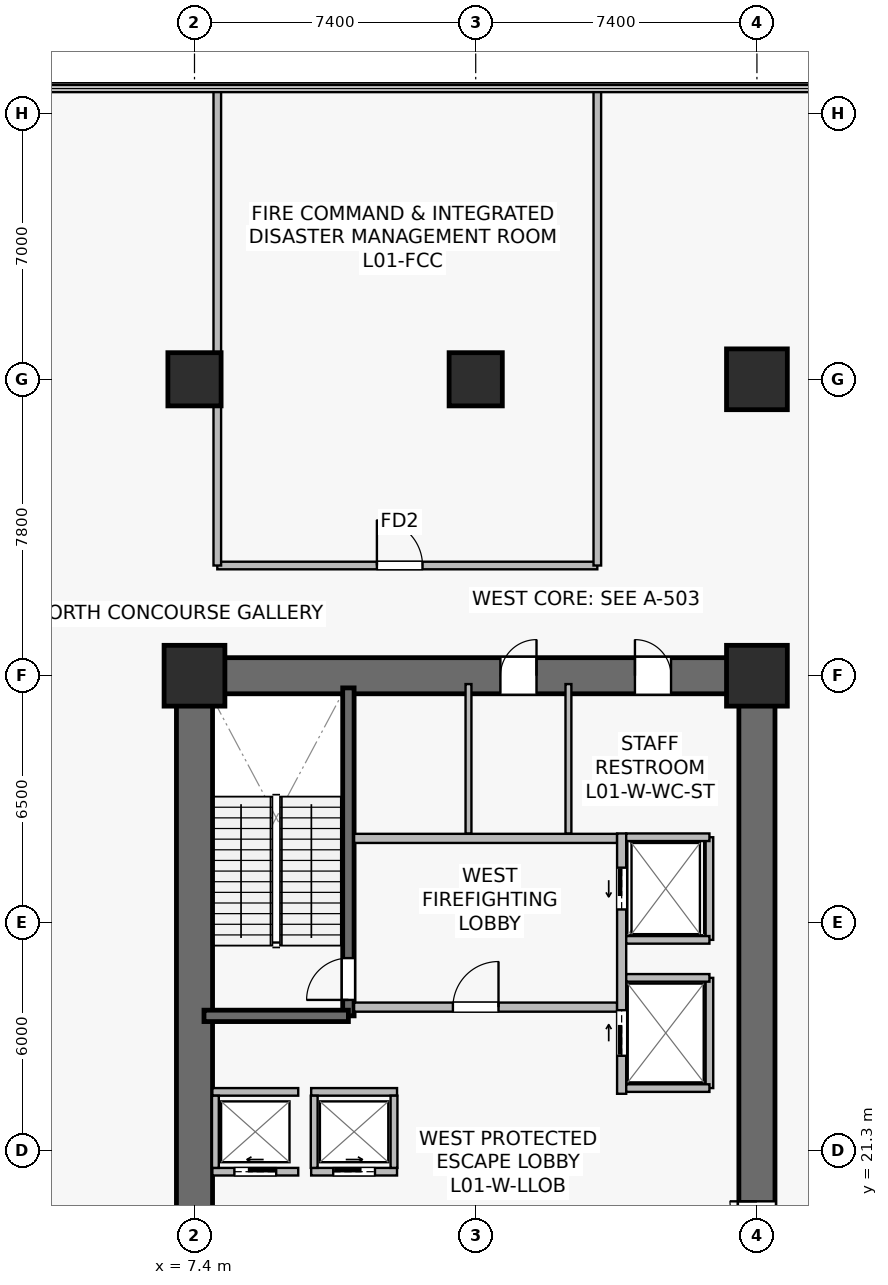
"""IFC4 building model, lengths in metres.
Left out: names, types, materials, properties, quantities, classifications, styles, units other than length and angle.
Written with IfcOpenShell. Run it as: python <this file> out.ifc"""

import sys

from ifc_helpers import new_model, si_unit, direction, frame, frame_2d, origin, origin_2d, place, context, subcontext, project, spatial, rectangle, extrude, source, transform, mapped, element, fill, save


model = new_model("IFC4")
c1 = context("Model", 3, precision=1e-05, world=origin(), true_north=direction((0.0, 1.0)))
c2 = subcontext(c1, "Body", "Model", "MODEL_VIEW")
j1 = project(units=[si_unit("LENGTHUNIT", "METRE"), si_unit("PLANEANGLEUNIT", "RADIAN")], contexts=[c1])
p1 = place(None, origin())
s1 = spatial("IfcSite", under=j1, at=p1, CompositionType="ELEMENT")
p2 = place(p1, origin())
s2 = spatial("IfcBuilding", under=s1, at=p2, CompositionType="ELEMENT")
p3 = place(p2, origin())
s3 = spatial("IfcBuildingStorey", under=s2, at=p3, CompositionType="ELEMENT", Elevation=0.0)
p4 = place(p3, frame((6.925, 33.8, 0.0), z_axis=(0.0, 0.0, 1.0), x_axis=(1.0, 0.0, 0.0)))
e1 = element("IfcWall", 1, at=p4, inside=s3, PredefinedType="SHEAR", context=c2, shape_type="SweptSolid", body=[
    extrude(rectangle(XDim=15.75, YDim=0.95, at=frame_2d((7.875, 0.0))), origin(), (0.0, 0.0, 1.0), 5.05),
])
p5 = place(p4, frame((8.525, 0.0, 0.0)))
e2 = element("IfcOpeningElement", 2, at=p5, cuts=e1, PredefinedType="OPENING", context=c2, shape_type="SweptSolid", body=[
    extrude(rectangle(XDim=0.95, YDim=2.15, at=frame_2d((0.475, 1.075))), frame((0.0, 0.485, 0.0), z_axis=(0.0, -1.0, 0.0), x_axis=(1.0, 0.0, 0.0)), (0.0, 0.0, 1.0), 0.97),
])
p6 = place(p4, frame((12.065, 0.0, 0.0)))
e3 = element("IfcOpeningElement", 3, at=p6, cuts=e1, PredefinedType="OPENING", context=c2, shape_type="SweptSolid", body=[
    extrude(rectangle(XDim=0.95, YDim=2.15, at=frame_2d((0.475, 1.075))), frame((0.0, 0.485, 0.0), z_axis=(0.0, -1.0, 0.0), x_axis=(1.0, 0.0, 0.0)), (0.0, 0.0, 1.0), 0.97),
])
p7 = place(p3, frame((7.4, 15.275, 0.0), z_axis=(0.0, 0.0, 1.0), x_axis=(0.0, 1.0, 0.0)))
e4 = element("IfcWall", 4, at=p7, inside=s3, PredefinedType="SHEAR", context=c2, shape_type="SweptSolid", body=[
    extrude(rectangle(XDim=18.05, YDim=0.95, at=frame_2d((9.025, 0.0))), origin(), (0.0, 0.0, 1.0), 5.05),
])
p8 = place(p3, frame((22.2, 15.275, 0.0), z_axis=(0.0, 0.0, 1.0), x_axis=(0.0, 1.0, 0.0)))
e5 = element("IfcWall", 5, at=p8, inside=s3, PredefinedType="SHEAR", context=c2, shape_type="SweptSolid", body=[
    extrude(rectangle(XDim=18.05, YDim=0.95, at=frame_2d((9.025, 0.0))), origin(), (0.0, 0.0, 1.0), 5.05),
])
p9 = place(p8, frame((3.275, 0.0, 0.0)))
e6 = element("IfcOpeningElement", 6, at=p9, cuts=e5, PredefinedType="OPENING", context=c2, shape_type="SweptSolid", body=[
    extrude(rectangle(XDim=1.42, YDim=2.2, at=frame_2d((0.71, 1.1))), frame((0.0, 0.485, 0.0), z_axis=(0.0, -1.0, 0.0), x_axis=(1.0, 0.0, 0.0)), (0.0, 0.0, 1.0), 0.97),
])
p10 = place(p3, frame((11.45, 24.85, 0.0), z_axis=(0.0, 0.0, 1.0), x_axis=(0.0, 1.0, 0.0)))
e7 = element("IfcWall", 7, at=p10, inside=s3, PredefinedType="SHEAR", context=c2, shape_type="SweptSolid", body=[
    extrude(rectangle(XDim=8.63, YDim=0.3, at=frame_2d((4.315, 0.0))), origin(), (0.0, 0.0, 1.0), 5.05),
])
p11 = place(p10, frame((0.42, 0.0, 0.0)))
e8 = element("IfcOpeningElement", 8, at=p11, cuts=e7, PredefinedType="OPENING", context=c2, shape_type="SweptSolid", body=[
    extrude(rectangle(XDim=1.1, YDim=2.15, at=frame_2d((0.55, 1.075))), frame((0.0, 0.16, 0.0), z_axis=(0.0, -1.0, 0.0), x_axis=(1.0, 0.0, 0.0)), (0.0, 0.0, 1.0), 0.32),
])
p12 = place(p3, frame((7.65, 24.85, 0.0), z_axis=(0.0, 0.0, 1.0), x_axis=(1.0, 0.0, 0.0)))
e9 = element("IfcWall", 9, at=p12, inside=s3, PredefinedType="SHEAR", context=c2, shape_type="SweptSolid", body=[
    extrude(rectangle(XDim=3.8, YDim=0.3, at=frame_2d((1.9, 0.0))), origin(), (0.0, 0.0, 1.0), 5.05),
])
m1 = source(origin(), c2, "Body", "SweptSolid", [
    extrude(rectangle(XDim=1.6, YDim=1.6, at=origin_2d()), origin(), (0.0, 0.0, 1.0), 5.4),
])
for number, where, z_axis, x_axis in (
    (10, (7.4, 33.8, 0.0), (0.0, 0.0, 1.0), (1.0, 0.0, 0.0)),
    (11, (22.2, 33.8, 0.0), (0.0, 0.0, 1.0), (1.0, 0.0, 0.0)),
):
    element("IfcColumn", number, at=place(p3, frame(where, z_axis=z_axis, x_axis=x_axis)), inside=s3, PredefinedType="COLUMN", context=c2, shape_type="MappedRepresentation", body=[
        mapped(m1, transform((0.0, 0.0, 0.0), scale=1.0)),
    ])
m2 = source(origin(), c2, "Body", "SweptSolid", [
    extrude(rectangle(XDim=1.4, YDim=1.4, at=origin_2d()), origin(), (0.0, 0.0, 1.0), 5.4),
])
p13 = place(p3, frame((14.8, 41.6, 0.0), z_axis=(0.0, 0.0, 1.0), x_axis=(1.0, 0.0, 0.0)))
e12 = element("IfcColumn", 12, at=p13, inside=s3, PredefinedType="COLUMN", context=c2, shape_type="MappedRepresentation", body=[
    mapped(m2, transform((0.0, 0.0, 0.0), scale=1.0)),
])
p14 = place(p3, frame((22.2, 41.6, 0.0), z_axis=(0.0, 0.0, 1.0), x_axis=(1.0, 0.0, 0.0)))
e13 = element("IfcColumn", 13, at=p14, inside=s3, PredefinedType="COLUMN", context=c2, shape_type="MappedRepresentation", body=[
    mapped(m1, transform((0.0, 0.0, 0.0), scale=1.0)),
])
p15 = place(p3, frame((7.4, 41.6, 0.0), z_axis=(0.0, 0.0, 1.0), x_axis=(1.0, 0.0, 0.0)))
e14 = element("IfcColumn", 14, at=p15, inside=s3, PredefinedType="COLUMN", context=c2, shape_type="MappedRepresentation", body=[
    mapped(m2, transform((0.0, 0.0, 0.0), scale=1.0)),
])
p16 = place(p3, frame((11.6, 25.08, 0.0), z_axis=(0.0, 0.0, 1.0), x_axis=(1.0, 0.0, 0.0)))
e15 = element("IfcWall", 15, at=p16, inside=s3, PredefinedType="SOLIDWALL", context=c2, shape_type="SweptSolid", body=[
    extrude(rectangle(XDim=6.92, YDim=0.24, at=frame_2d((3.46, 0.0))), origin(), (0.0, 0.0, 1.0), 4.335),
])
p17 = place(p16, frame((2.6, 0.0, 0.0)))
e16 = element("IfcOpeningElement", 16, at=p17, cuts=e15, PredefinedType="OPENING", context=c2, shape_type="SweptSolid", body=[
    extrude(rectangle(XDim=1.2, YDim=2.16, at=frame_2d((0.6, 1.08))), frame((0.0, 0.13, 0.0), z_axis=(0.0, -1.0, 0.0), x_axis=(1.0, 0.0, 0.0)), (0.0, 0.0, 1.0), 0.26),
])
p18 = place(p3, frame((11.6, 29.52, 0.0), z_axis=(0.0, 0.0, 1.0), x_axis=(1.0, 0.0, 0.0)))
e17 = element("IfcWall", 17, at=p18, inside=s3, PredefinedType="SOLIDWALL", context=c2, shape_type="SweptSolid", body=[
    extrude(rectangle(XDim=6.92, YDim=0.24, at=frame_2d((3.46, 0.0))), origin(), (0.0, 0.0, 1.0), 4.335),
])
p19 = place(p3, frame((18.64, 22.8, 0.0), z_axis=(0.0, 0.0, 1.0), x_axis=(0.0, 1.0, 0.0)))
e18 = element("IfcWall", 18, at=p19, inside=s3, PredefinedType="SOLIDWALL", context=c2, shape_type="SweptSolid", body=[
    extrude(rectangle(XDim=6.85, YDim=0.24, at=frame_2d((3.425, 0.0))), origin(), (0.0, 0.0, 1.0), 4.135),
])
p20 = place(p19, frame((4.85, 0.0, 0.0)))
e19 = element("IfcOpeningElement", 19, at=p20, cuts=e18, PredefinedType="OPENING", context=c2, shape_type="SweptSolid", body=[
    extrude(rectangle(XDim=1.1, YDim=2.22, at=frame_2d((0.55, 1.11))), frame((0.0, 0.13, 0.0), z_axis=(0.0, -1.0, 0.0), x_axis=(1.0, 0.0, 0.0)), (0.0, 0.0, 1.0), 0.26),
])
p21 = place(p19, frame((1.0, 0.0, 0.0)))
e20 = element("IfcOpeningElement", 20, at=p21, cuts=e18, PredefinedType="OPENING", context=c2, shape_type="SweptSolid", body=[
    extrude(rectangle(XDim=1.2, YDim=2.22, at=frame_2d((0.6, 1.11))), frame((0.0, 0.13, 0.0), z_axis=(0.0, -1.0, 0.0), x_axis=(1.0, 0.0, 0.0)), (0.0, 0.0, 1.0), 0.26),
])
p22 = place(p3, frame((7.87, 20.75, 0.0), z_axis=(0.0, 0.0, 1.0), x_axis=(1.0, 0.0, 0.0)))
e21 = element("IfcWall", 21, at=p22, inside=s3, PredefinedType="SOLIDWALL", context=c2, shape_type="SweptSolid", body=[
    extrude(rectangle(XDim=2.26, YDim=0.2, at=frame_2d((1.13, 0.0))), origin(), (0.0, 0.0, 1.0), 5.05),
])
p23 = place(p22, frame((0.58, 0.0, 0.0)))
e22 = element("IfcOpeningElement", 22, at=p23, cuts=e21, PredefinedType="OPENING", context=c2, shape_type="SweptSolid", body=[
    extrude(rectangle(XDim=1.1, YDim=2.22, at=frame_2d((0.55, 1.11))), frame((0.0, 0.11, 0.0), z_axis=(0.0, -1.0, 0.0), x_axis=(1.0, 0.0, 0.0)), (0.0, 0.0, 1.0), 0.22),
])
p24 = place(p3, frame((7.87, 22.85, 0.0), z_axis=(0.0, 0.0, 1.0), x_axis=(1.0, 0.0, 0.0)))
e23 = element("IfcWall", 23, at=p24, inside=s3, PredefinedType="SOLIDWALL", context=c2, shape_type="SweptSolid", body=[
    extrude(rectangle(XDim=2.26, YDim=0.2, at=frame_2d((1.13, 0.0))), origin(), (0.0, 0.0, 1.0), 5.05),
])
p25 = place(p3, frame((7.95, 20.85, 0.0), z_axis=(0.0, 0.0, 1.0), x_axis=(0.0, 1.0, 0.0)))
e24 = element("IfcWall", 24, at=p25, inside=s3, PredefinedType="SOLIDWALL", context=c2, shape_type="SweptSolid", body=[
    extrude(rectangle(XDim=1.9, YDim=0.18, at=frame_2d((0.95, 0.0))), origin(), (0.0, 0.0, 1.0), 5.05),
])
p26 = place(p3, frame((10.47, 20.75, 0.0), z_axis=(0.0, 0.0, 1.0), x_axis=(1.0, 0.0, 0.0)))
e25 = element("IfcWall", 25, at=p26, inside=s3, PredefinedType="SOLIDWALL", context=c2, shape_type="SweptSolid", body=[
    extrude(rectangle(XDim=2.26, YDim=0.2, at=frame_2d((1.13, 0.0))), origin(), (0.0, 0.0, 1.0), 5.05),
])
p27 = place(p26, frame((0.58, 0.0, 0.0)))
e26 = element("IfcOpeningElement", 26, at=p27, cuts=e25, PredefinedType="OPENING", context=c2, shape_type="SweptSolid", body=[
    extrude(rectangle(XDim=1.1, YDim=2.22, at=frame_2d((0.55, 1.11))), frame((0.0, 0.11, 0.0), z_axis=(0.0, -1.0, 0.0), x_axis=(1.0, 0.0, 0.0)), (0.0, 0.0, 1.0), 0.22),
])
p28 = place(p3, frame((10.47, 22.85, 0.0), z_axis=(0.0, 0.0, 1.0), x_axis=(1.0, 0.0, 0.0)))
e27 = element("IfcWall", 27, at=p28, inside=s3, PredefinedType="SOLIDWALL", context=c2, shape_type="SweptSolid", body=[
    extrude(rectangle(XDim=2.26, YDim=0.2, at=frame_2d((1.13, 0.0))), origin(), (0.0, 0.0, 1.0), 5.05),
])
for number, where, z_axis, x_axis in (
    (28, (10.55, 20.85, 0.0), (0.0, 0.0, 1.0), (0.0, 1.0, 0.0)),
    (29, (12.65, 20.85, 0.0), (0.0, 0.0, 1.0), (0.0, 1.0, 0.0)),
):
    element("IfcWall", number, at=place(p3, frame(where, z_axis=z_axis, x_axis=x_axis)), inside=s3, PredefinedType="SOLIDWALL", context=c2, shape_type="SweptSolid", body=[
        extrude(rectangle(XDim=1.9, YDim=0.18, at=frame_2d((0.95, 0.0))), origin(), (0.0, 0.0, 1.0), 5.05),
    ])
p29 = place(p3, frame((20.95, 26.85, 0.0), z_axis=(0.0, 0.0, 1.0), x_axis=(0.0, 1.0, 0.0)))
e30 = element("IfcWall", 30, at=p29, inside=s3, PredefinedType="SOLIDWALL", context=c2, shape_type="SweptSolid", body=[
    extrude(rectangle(XDim=2.7, YDim=0.2, at=frame_2d((1.35, 0.0))), origin(), (0.0, 0.0, 1.0), 5.05),
])
p30 = place(p3, frame((18.76, 29.55, 0.0), z_axis=(0.0, 0.0, 1.0), x_axis=(1.0, 0.0, 0.0)))
e31 = element("IfcWall", 31, at=p30, inside=s3, PredefinedType="SOLIDWALL", context=c2, shape_type="SweptSolid", body=[
    extrude(rectangle(XDim=2.19, YDim=0.2, at=frame_2d((1.095, 0.0))), origin(), (0.0, 0.0, 1.0), 5.05),
])
p31 = place(p3, frame((18.76, 26.85, 0.0), z_axis=(0.0, 0.0, 1.0), x_axis=(1.0, 0.0, 0.0)))
e32 = element("IfcWall", 32, at=p31, inside=s3, PredefinedType="SOLIDWALL", context=c2, shape_type="SweptSolid", body=[
    extrude(rectangle(XDim=2.19, YDim=0.2, at=frame_2d((1.095, 0.0))), origin(), (0.0, 0.0, 1.0), 4.447),
])
p32 = place(p3, frame((20.95, 22.95, 0.0), z_axis=(0.0, 0.0, 1.0), x_axis=(0.0, 1.0, 0.0)))
e33 = element("IfcWall", 33, at=p32, inside=s3, PredefinedType="SOLIDWALL", context=c2, shape_type="SweptSolid", body=[
    extrude(rectangle(XDim=2.9, YDim=0.2, at=frame_2d((1.45, 0.0))), origin(), (0.0, 0.0, 1.0), 4.135),
])
for number, where, z_axis, x_axis in (
    (34, (18.76, 25.85, 0.0), (0.0, 0.0, 1.0), (1.0, 0.0, 0.0)),
    (35, (18.76, 22.95, 0.0), (0.0, 0.0, 1.0), (1.0, 0.0, 0.0)),
):
    element("IfcWall", number, at=place(p3, frame(where, z_axis=z_axis, x_axis=x_axis)), inside=s3, PredefinedType="SOLIDWALL", context=c2, shape_type="SweptSolid", body=[
        extrude(rectangle(XDim=2.19, YDim=0.2, at=frame_2d((1.095, 0.0))), origin(), (0.0, 0.0, 1.0), 5.05),
    ])
p33 = place(p3, frame((14.61, 29.65, 0.0), z_axis=(0.0, 0.0, 1.0), x_axis=(0.0, 1.0, 0.0)))
e36 = element("IfcWall", 36, at=p33, inside=s3, PredefinedType="PLUMBINGWALL", context=c2, shape_type="SweptSolid", body=[
    extrude(rectangle(XDim=3.93, YDim=0.155, at=frame_2d((1.965, 0.0))), origin(), (0.0, 0.0, 1.0), 4.335),
])
p34 = place(p3, frame((17.24, 29.65, 0.0), z_axis=(0.0, 0.0, 1.0), x_axis=(0.0, 1.0, 0.0)))
e37 = element("IfcWall", 37, at=p34, inside=s3, PredefinedType="PLUMBINGWALL", context=c2, shape_type="SweptSolid", body=[
    extrude(rectangle(XDim=3.93, YDim=0.155, at=frame_2d((1.965, 0.0))), origin(), (0.0, 0.0, 1.0), 5.05),
])
p35 = place(p3, frame((8.0, 36.7, 0.0), z_axis=(0.0, 0.0, 1.0), x_axis=(1.0, 0.0, 0.0)))
e38 = element("IfcWall", 38, at=p35, inside=s3, PredefinedType="SOLIDWALL", context=c2, shape_type="SweptSolid", body=[
    extrude(rectangle(XDim=10.0, YDim=0.2, at=frame_2d((5.0, 0.0))), origin(), (0.0, 0.0, 1.0), 4.335),
])
p36 = place(p35, frame((4.2, 0.0, 0.0)))
e39 = element("IfcOpeningElement", 39, at=p36, cuts=e38, PredefinedType="OPENING", context=c2, shape_type="SweptSolid", body=[
    extrude(rectangle(XDim=1.2, YDim=2.16, at=frame_2d((0.6, 1.08))), frame((0.0, 0.11, 0.0), z_axis=(0.0, -1.0, 0.0), x_axis=(1.0, 0.0, 0.0)), (0.0, 0.0, 1.0), 0.22),
])
for number, where, z_axis, x_axis in (
    (40, (8.0, 36.7, 0.0), (0.0, 0.0, 1.0), (0.0, 1.0, 0.0)),
    (41, (18.0, 36.7, 0.0), (0.0, 0.0, 1.0), (0.0, 1.0, 0.0)),
):
    element("IfcWall", number, at=place(p3, frame(where, z_axis=z_axis, x_axis=x_axis)), inside=s3, PredefinedType="SOLIDWALL", context=c2, shape_type="SweptSolid", body=[
        extrude(rectangle(XDim=12.55, YDim=0.2, at=frame_2d((6.275, 0.0))), origin(), (0.0, 0.0, 1.0), 4.235),
    ])
m3 = source(origin(), c2, "Body", "SweptSolid", [
    extrude(rectangle(XDim=1.1, YDim=2.15, at=frame_2d((0.55, 1.075))), frame((0.0, 0.025, 0.0), z_axis=(0.0, -1.0, 0.0), x_axis=(1.0, 0.0, 0.0)), (0.0, 0.0, 1.0), 0.05),
])
p37 = place(p11, origin())
e42 = element("IfcDoor", 42, at=p37, inside=s3, OperationType="SINGLE_SWING_LEFT", PredefinedType="DOOR", context=c2, shape_type="MappedRepresentation", body=[
    mapped(m3, transform((0.0, 0.0, 0.0), scale=1.0)),
])
fill(e8, e42)
m4 = source(origin(), c2, "Body", "SweptSolid", [
    extrude(rectangle(XDim=1.2, YDim=2.16, at=frame_2d((0.6, 1.08))), frame((0.0, 0.025, 0.0), z_axis=(0.0, -1.0, 0.0), x_axis=(1.0, 0.0, 0.0)), (0.0, 0.0, 1.0), 0.05),
])
p38 = place(p17, origin())
e43 = element("IfcDoor", 43, at=p38, inside=s3, OperationType="SINGLE_SWING_RIGHT", PredefinedType="DOOR", context=c2, shape_type="MappedRepresentation", body=[
    mapped(m4, transform((0.0, 0.0, 0.0), scale=1.0)),
])
fill(e16, e43)
m5 = source(origin(), c2, "Body", "SweptSolid", [
    extrude(rectangle(XDim=1.1, YDim=2.22, at=frame_2d((0.55, 1.11))), frame((0.0, 0.025, 0.0), z_axis=(0.0, -1.0, 0.0), x_axis=(1.0, 0.0, 0.0)), (0.0, 0.0, 1.0), 0.05),
])
p39 = place(p23, origin())
e44 = element("IfcDoor", 44, at=p39, inside=s3, OperationType="SLIDING_TO_LEFT", PredefinedType="USERDEFINED", context=c2, shape_type="MappedRepresentation", body=[
    mapped(m5, transform((0.0, 0.0, 0.0), scale=1.0)),
])
fill(e22, e44)
p40 = place(p27, origin())
e45 = element("IfcDoor", 45, at=p40, inside=s3, OperationType="SLIDING_TO_RIGHT", PredefinedType="USERDEFINED", context=c2, shape_type="MappedRepresentation", body=[
    mapped(m5, transform((0.0, 0.0, 0.0), scale=1.0)),
])
fill(e26, e45)
p41 = place(p20, origin())
e46 = element("IfcDoor", 46, at=p41, inside=s3, OperationType="SLIDING_TO_LEFT", PredefinedType="USERDEFINED", context=c2, shape_type="MappedRepresentation", body=[
    mapped(m5, transform((0.0, 0.0, 0.0), scale=1.0)),
])
fill(e19, e46)
m6 = source(origin(), c2, "Body", "SweptSolid", [
    extrude(rectangle(XDim=1.2, YDim=2.22, at=frame_2d((0.6, 1.11))), frame((0.0, 0.025, 0.0), z_axis=(0.0, -1.0, 0.0), x_axis=(1.0, 0.0, 0.0)), (0.0, 0.0, 1.0), 0.05),
])
p42 = place(p21, origin())
e47 = element("IfcDoor", 47, at=p42, inside=s3, OperationType="SLIDING_TO_RIGHT", PredefinedType="USERDEFINED", context=c2, shape_type="MappedRepresentation", body=[
    mapped(m6, transform((0.0, 0.0, 0.0), scale=1.0)),
])
fill(e20, e47)
m7 = source(origin(), c2, "Body", "SweptSolid", [
    extrude(rectangle(XDim=1.42, YDim=2.2, at=frame_2d((0.71, 1.1))), frame((0.0, 0.025, 0.0), z_axis=(0.0, -1.0, 0.0), x_axis=(1.0, 0.0, 0.0)), (0.0, 0.0, 1.0), 0.05),
])
p43 = place(p9, origin())
e48 = element("IfcDoor", 48, at=p43, inside=s3, OperationType="DOUBLE_DOOR_SINGLE_SWING", PredefinedType="DOOR", context=c2, shape_type="MappedRepresentation", body=[
    mapped(m7, transform((0.0, 0.0, 0.0), scale=1.0)),
])
fill(e6, e48)
m8 = source(origin(), c2, "Body", "SweptSolid", [
    extrude(rectangle(XDim=0.95, YDim=2.15, at=frame_2d((0.475, 1.075))), frame((0.0, 0.025, 0.0), z_axis=(0.0, -1.0, 0.0), x_axis=(1.0, 0.0, 0.0)), (0.0, 0.0, 1.0), 0.05),
])
p44 = place(p5, origin())
e49 = element("IfcDoor", 49, at=p44, inside=s3, OperationType="SINGLE_SWING_RIGHT", PredefinedType="DOOR", context=c2, shape_type="MappedRepresentation", body=[
    mapped(m8, transform((0.0, 0.0, 0.0), scale=1.0)),
])
fill(e2, e49)
p45 = place(p6, origin())
e50 = element("IfcDoor", 50, at=p45, inside=s3, OperationType="SINGLE_SWING_LEFT", PredefinedType="DOOR", context=c2, shape_type="MappedRepresentation", body=[
    mapped(m8, transform((0.0, 0.0, 0.0), scale=1.0)),
])
fill(e3, e50)
p46 = place(p36, origin())
e51 = element("IfcDoor", 51, at=p46, inside=s3, OperationType="SINGLE_SWING_LEFT", PredefinedType="DOOR", context=c2, shape_type="MappedRepresentation", body=[
    mapped(m4, transform((0.0, 0.0, 0.0), scale=1.0)),
])
fill(e39, e51)
save(model, sys.argv[1])
